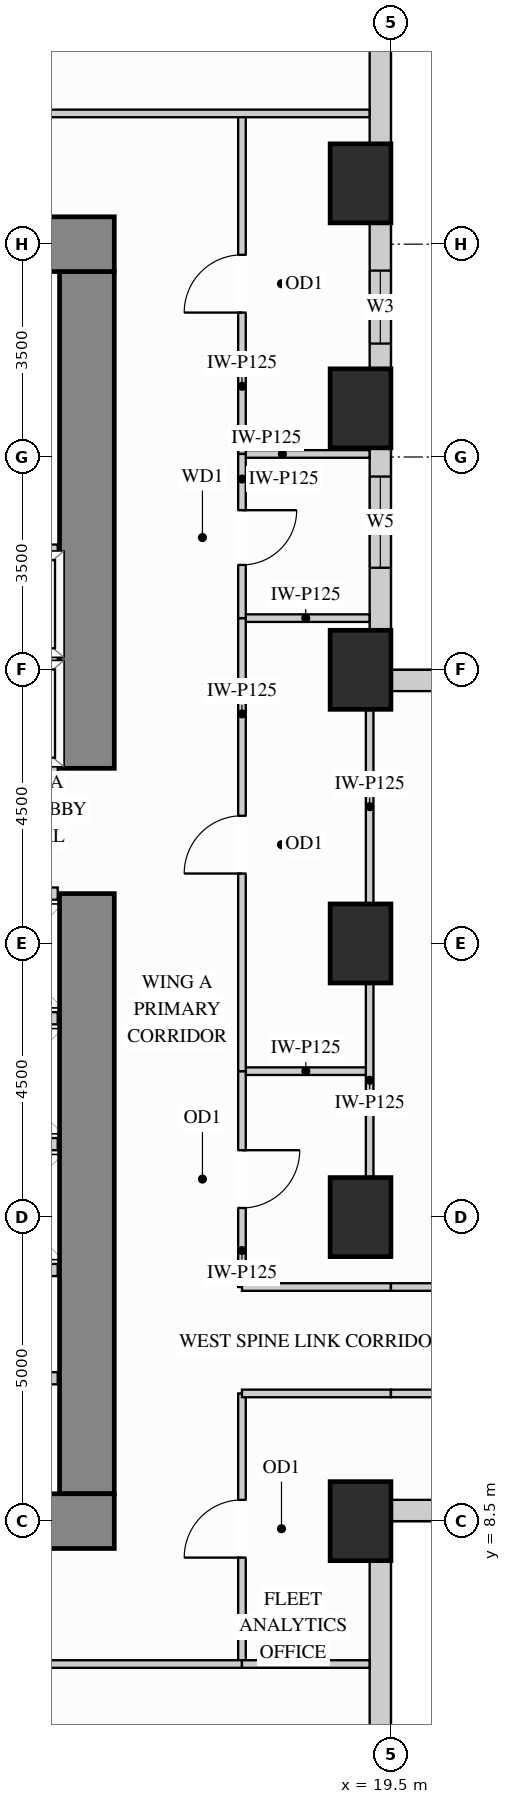
"""IFC4 building model, lengths in metres.
Left out: names, types, materials, properties, quantities, classifications, styles, units other than length and angle.
Written with IfcOpenShell. Run it as: python <this file> out.ifc"""

import sys

from ifc_helpers import new_model, si_unit, direction, frame, frame_2d, origin, origin_2d, place, context, subcontext, project, spatial, rectangle, extrude, source, transform, mapped, element, fill, save


model = new_model("IFC4")
c1 = context("Model", 3, precision=1e-05, world=origin(), true_north=direction((0.0, 1.0)))
c2 = subcontext(c1, "Body", "Model", "MODEL_VIEW")
j1 = project(units=[si_unit("LENGTHUNIT", "METRE"), si_unit("PLANEANGLEUNIT", "RADIAN")], contexts=[c1])
p1 = place(None, origin())
s1 = spatial("IfcSite", under=j1, at=p1, CompositionType="ELEMENT")
p2 = place(p1, origin())
s2 = spatial("IfcBuilding", under=s1, at=p2, CompositionType="ELEMENT")
p3 = place(p2, frame((0.0, 0.0, 62.1)))
s3 = spatial("IfcBuildingStorey", under=s2, at=p3, CompositionType="ELEMENT", Elevation=62.1)
m1 = source(origin(), c2, "Body", "SweptSolid", [
    extrude(rectangle(XDim=1.0, YDim=1.3, at=origin_2d()), origin(), (0.0, 0.0, 1.0), 3.38),
])
for number, where, z_axis, x_axis in (
    (1, (19.0, 13.5, 0.0), (0.0, 0.0, 1.0), (1.0, 0.0, 0.0)),
    (2, (19.0, 18.0, 0.0), (0.0, 0.0, 1.0), (1.0, 0.0, 0.0)),
    (3, (19.0, 22.5, 0.0), (0.0, 0.0, 1.0), (1.0, 0.0, 0.0)),
    (4, (19.0, 26.8, 0.0), (0.0, 0.0, 1.0), (1.0, 0.0, 0.0)),
    (5, (19.0, 30.5, 0.0), (0.0, 0.0, 1.0), (1.0, 0.0, 0.0)),
    (6, (19.0, 8.5, 0.0), (0.0, 0.0, 1.0), (1.0, 0.0, 0.0)),
):
    element("IfcColumn", number, at=place(p3, frame(where, z_axis=z_axis, x_axis=x_axis)), inside=s3, PredefinedType="COLUMN", context=c2, shape_type="MappedRepresentation", body=[
        mapped(m1, transform((0.0, 0.0, 0.0), x_axis=(1.0, 0.0, 0.0), y_axis=(0.0, 1.0, 0.0), z_axis=(0.0, 0.0, 1.0))),
    ])
m2 = source(origin(), c2, "Body", "SweptSolid", [
    extrude(rectangle(XDim=9.87, YDim=0.9, at=frame_2d((4.935, 0.0))), origin(), (0.0, 0.0, 1.0), 3.38),
])
p4 = place(p3, frame((14.5, 8.95, 0.0), z_axis=(0.0, 0.0, 1.0), x_axis=(0.0, 1.0, 0.0)))
e7 = element("IfcWall", 7, at=p4, inside=s3, PredefinedType="SHEAR", context=c2, shape_type="MappedRepresentation", body=[
    mapped(m2, transform((0.0, 0.0, 0.0), x_axis=(1.0, 0.0, 0.0), y_axis=(0.0, 1.0, 0.0), z_axis=(0.0, 0.0, 1.0))),
])
m3 = source(origin(), c2, "Body", "SweptSolid", [
    extrude(rectangle(XDim=8.17, YDim=0.9, at=frame_2d((4.085, 0.0))), origin(), (0.0, 0.0, 1.0), 3.38),
])
p5 = place(p3, frame((14.5, 20.88, 0.0), z_axis=(0.0, 0.0, 1.0), x_axis=(0.0, 1.0, 0.0)))
e8 = element("IfcWall", 8, at=p5, inside=s3, PredefinedType="SHEAR", context=c2, shape_type="MappedRepresentation", body=[
    mapped(m3, transform((0.0, 0.0, 0.0), x_axis=(1.0, 0.0, 0.0), y_axis=(0.0, 1.0, 0.0), z_axis=(0.0, 0.0, 1.0))),
])
m4 = source(origin(), c2, "Body", "SweptSolid", [
    extrude(rectangle(XDim=10.9, YDim=0.9, at=frame_2d((5.45, 0.0))), origin(), (0.0, 0.0, 1.0), 3.38),
])
for number, where, z_axis, x_axis in (
    (9, (4.05, 29.5, 0.0), (0.0, 0.0, 1.0), (1.0, 0.0, 0.0)),
    (10, (4.05, 8.5, 0.0), (0.0, 0.0, 1.0), (1.0, 0.0, 0.0)),
):
    element("IfcWall", number, at=place(p3, frame(where, z_axis=z_axis, x_axis=x_axis)), inside=s3, PredefinedType="SHEAR", context=c2, shape_type="MappedRepresentation", body=[
        mapped(m4, transform((0.0, 0.0, 0.0), x_axis=(1.0, 0.0, 0.0), y_axis=(0.0, 1.0, 0.0), z_axis=(0.0, 0.0, 1.0))),
    ])
m5 = source(origin(), c2, "Body", "SweptSolid", [
    extrude(rectangle(XDim=3.704, YDim=0.35, at=frame_2d((1.852, 0.0))), origin(), (0.0, 0.0, 1.0), 2.51),
])
p6 = place(p3, frame((19.325, 4.148, 0.0), z_axis=(0.0, 0.0, 1.0), x_axis=(0.0, 1.0, 0.0)))
e11 = element("IfcWall", 11, at=p6, inside=s3, PredefinedType="SOLIDWALL", context=c2, shape_type="MappedRepresentation", body=[
    mapped(m5, transform((0.0, 0.0, 0.0), x_axis=(1.0, 0.0, 0.0), y_axis=(0.0, 1.0, 0.0), z_axis=(0.0, 0.0, 1.0))),
])
p7 = place(p3, frame((19.498, 8.675, 0.0), z_axis=(0.0, 0.0, 1.0), x_axis=(1.0, 0.0, 0.0)))
e12 = element("IfcWall", 12, at=p7, inside=s3, PredefinedType="SOLIDWALL", context=c2, shape_type="SweptSolid", body=[
    extrude(rectangle(XDim=3.404, YDim=0.35, at=frame_2d((1.702, 0.0))), origin(), (0.0, 0.0, 1.0), 3.365),
])
p8 = place(p7, frame((0.952, 0.0, 0.78)))
e13 = element("IfcOpeningElement", 13, at=p8, cuts=e12, PredefinedType="OPENING", context=c2, shape_type="SweptSolid", body=[
    extrude(rectangle(XDim=1.5, YDim=2.0, at=frame_2d((0.75, 1.0))), frame((0.0, 0.185, 0.0), z_axis=(0.0, -1.0, 0.0), x_axis=(1.0, 0.0, 0.0)), (0.0, 0.0, 1.0), 0.37),
])
p9 = place(p3, frame((34.352, 22.325, 0.0), z_axis=(0.0, 0.0, 1.0), x_axis=(-1.0, 0.0, 0.0)))
e14 = element("IfcWall", 14, at=p9, inside=s3, PredefinedType="SOLIDWALL", context=c2, shape_type="SweptSolid", body=[
    extrude(rectangle(XDim=14.854, YDim=0.35, at=frame_2d((7.427, 0.0))), origin(), (0.0, 0.0, 1.0), 3.365),
])
p10 = place(p9, frame((4.058, 0.0, 0.78)))
e15 = element("IfcOpeningElement", 15, at=p10, cuts=e14, PredefinedType="OPENING", context=c2, shape_type="SweptSolid", body=[
    extrude(rectangle(XDim=1.5, YDim=2.0, at=frame_2d((0.75, 1.0))), frame((0.0, 0.185, 0.0), z_axis=(0.0, -1.0, 0.0), x_axis=(1.0, 0.0, 0.0)), (0.0, 0.0, 1.0), 0.37),
])
p11 = place(p9, frame((9.296, 0.0, 0.78)))
e16 = element("IfcOpeningElement", 16, at=p11, cuts=e14, PredefinedType="OPENING", context=c2, shape_type="SweptSolid", body=[
    extrude(rectangle(XDim=1.5, YDim=2.0, at=frame_2d((0.75, 1.0))), frame((0.0, 0.185, 0.0), z_axis=(0.0, -1.0, 0.0), x_axis=(1.0, 0.0, 0.0)), (0.0, 0.0, 1.0), 0.37),
])
p12 = place(p3, frame((19.325, 23.148, 0.0), z_axis=(0.0, 0.0, 1.0), x_axis=(0.0, 1.0, 0.0)))
e17 = element("IfcWall", 17, at=p12, inside=s3, PredefinedType="SOLIDWALL", context=c2, shape_type="SweptSolid", body=[
    extrude(rectangle(XDim=3.004, YDim=0.35, at=frame_2d((1.502, 0.0))), origin(), (0.0, 0.0, 1.0), 2.51),
])
p13 = place(p12, frame((1.031, 0.0, 0.78)))
e18 = element("IfcOpeningElement", 18, at=p13, cuts=e17, PredefinedType="OPENING", context=c2, shape_type="SweptSolid", body=[
    extrude(rectangle(XDim=1.5, YDim=1.55, at=frame_2d((0.75, 0.775))), frame((0.0, 0.185, 0.0), z_axis=(0.0, -1.0, 0.0), x_axis=(1.0, 0.0, 0.0)), (0.0, 0.0, 1.0), 0.37),
])
p14 = place(p3, frame((19.325, 27.448, 0.0), z_axis=(0.0, 0.0, 1.0), x_axis=(0.0, 1.0, 0.0)))
e19 = element("IfcWall", 19, at=p14, inside=s3, PredefinedType="SOLIDWALL", context=c2, shape_type="SweptSolid", body=[
    extrude(rectangle(XDim=2.404, YDim=0.35, at=frame_2d((1.202, 0.0))), origin(), (0.0, 0.0, 1.0), 2.51),
])
p15 = place(p14, frame((0.417, 0.0, 0.78)))
e20 = element("IfcOpeningElement", 20, at=p15, cuts=e19, PredefinedType="OPENING", context=c2, shape_type="SweptSolid", body=[
    extrude(rectangle(XDim=1.2, YDim=1.55, at=frame_2d((0.6, 0.775))), frame((0.0, 0.185, 0.0), z_axis=(0.0, -1.0, 0.0), x_axis=(1.0, 0.0, 0.0)), (0.0, 0.0, 1.0), 0.37),
])
m6 = source(origin(), c2, "Body", "SweptSolid", [
    extrude(rectangle(XDim=3.204, YDim=0.35, at=frame_2d((1.602, 0.0))), origin(), (0.0, 0.0, 1.0), 2.51),
])
p16 = place(p3, frame((19.325, 31.148, 0.0), z_axis=(0.0, 0.0, 1.0), x_axis=(0.0, 1.0, 0.0)))
e21 = element("IfcWall", 21, at=p16, inside=s3, PredefinedType="SOLIDWALL", context=c2, shape_type="MappedRepresentation", body=[
    mapped(m6, transform((0.0, 0.0, 0.0), x_axis=(1.0, 0.0, 0.0), y_axis=(0.0, 1.0, 0.0), z_axis=(0.0, 0.0, 1.0))),
])
m7 = source(origin(), c2, "Body", "SweptSolid", [
    extrude(rectangle(XDim=2.1, YDim=0.125, at=frame_2d((1.05, 0.0))), origin(), (0.0, 0.0, 1.0), 3.365),
])
p17 = place(p3, frame((17.05, 15.9, 0.0), z_axis=(0.0, 0.0, 1.0), x_axis=(1.0, 0.0, 0.0)))
e22 = element("IfcWall", 22, at=p17, inside=s3, PredefinedType="PARTITIONING", context=c2, shape_type="MappedRepresentation", body=[
    mapped(m7, transform((0.0, 0.0, 0.0), x_axis=(1.0, 0.0, 0.0), y_axis=(0.0, 1.0, 0.0), z_axis=(0.0, 0.0, 1.0))),
])
m8 = source(origin(), c2, "Body", "SweptSolid", [
    extrude(rectangle(XDim=2.098, YDim=0.125, at=frame_2d((1.049, 0.0))), origin(), (0.0, 0.0, 1.0), 3.365),
])
for number, where, z_axis, x_axis in (
    (23, (17.05, 23.35, 0.0), (0.0, 0.0, 1.0), (1.0, 0.0, 0.0)),
    (24, (17.05, 26.05, 0.0), (0.0, 0.0, 1.0), (1.0, 0.0, 0.0)),
):
    element("IfcWall", number, at=place(p3, frame(where, z_axis=z_axis, x_axis=x_axis)), inside=s3, PredefinedType="PARTITIONING", context=c2, shape_type="MappedRepresentation", body=[
        mapped(m8, transform((0.0, 0.0, 0.0), x_axis=(1.0, 0.0, 0.0), y_axis=(0.0, 1.0, 0.0), z_axis=(0.0, 0.0, 1.0))),
    ])
m9 = source(origin(), c2, "Body", "SweptSolid", [
    extrude(rectangle(XDim=3.18, YDim=0.125, at=frame_2d((1.59, 0.0))), origin(), (0.0, 0.0, 1.0), 2.67),
])
for number, where, z_axis, x_axis in (
    (25, (19.15, 14.16, 0.0), (0.0, 0.0, 1.0), (0.0, 1.0, 0.0)),
    (26, (19.15, 18.66, 0.0), (0.0, 0.0, 1.0), (0.0, 1.0, 0.0)),
):
    element("IfcWall", number, at=place(p3, frame(where, z_axis=z_axis, x_axis=x_axis)), inside=s3, PredefinedType="PARTITIONING", context=c2, shape_type="MappedRepresentation", body=[
        mapped(m9, transform((0.0, 0.0, 0.0), x_axis=(1.0, 0.0, 0.0), y_axis=(0.0, 1.0, 0.0), z_axis=(0.0, 0.0, 1.0))),
    ])
p18 = place(p3, frame((17.05, 12.35, 0.0), z_axis=(0.0, 0.0, 1.0), x_axis=(0.0, 1.0, 0.0)))
e27 = element("IfcWall", 27, at=p18, inside=s3, PredefinedType="PARTITIONING", context=c2, shape_type="SweptSolid", body=[
    extrude(rectangle(XDim=3.55, YDim=0.125, at=frame_2d((1.775, 0.0))), origin(), (0.0, 0.0, 1.0), 3.365),
])
p19 = place(p18, frame((1.3, 0.0, 0.0)))
e28 = element("IfcOpeningElement", 28, at=p19, cuts=e27, PredefinedType="OPENING", context=c2, shape_type="SweptSolid", body=[
    extrude(rectangle(XDim=0.95, YDim=2.15, at=frame_2d((0.475, 1.075))), frame((0.0, 0.073, 0.0), z_axis=(0.0, -1.0, 0.0), x_axis=(1.0, 0.0, 0.0)), (0.0, 0.0, 1.0), 0.145),
])
p20 = place(p3, frame((17.05, 15.9, 0.0), z_axis=(0.0, 0.0, 1.0), x_axis=(0.0, 1.0, 0.0)))
e29 = element("IfcWall", 29, at=p20, inside=s3, PredefinedType="PARTITIONING", context=c2, shape_type="SweptSolid", body=[
    extrude(rectangle(XDim=7.45, YDim=0.125, at=frame_2d((3.725, 0.0))), origin(), (0.0, 0.0, 1.0), 3.365),
])
p21 = place(p20, frame((3.25, 0.0, 0.0)))
e30 = element("IfcOpeningElement", 30, at=p21, cuts=e29, PredefinedType="OPENING", context=c2, shape_type="SweptSolid", body=[
    extrude(rectangle(XDim=0.95, YDim=2.15, at=frame_2d((0.475, 1.075))), frame((0.0, 0.073, 0.0), z_axis=(0.0, -1.0, 0.0), x_axis=(1.0, 0.0, 0.0)), (0.0, 0.0, 1.0), 0.145),
])
p22 = place(p3, frame((17.05, 26.05, 0.0), z_axis=(0.0, 0.0, 1.0), x_axis=(0.0, 1.0, 0.0)))
e31 = element("IfcWall", 31, at=p22, inside=s3, PredefinedType="PARTITIONING", context=c2, shape_type="SweptSolid", body=[
    extrude(rectangle(XDim=5.6, YDim=0.125, at=frame_2d((2.8, 0.0))), origin(), (0.0, 0.0, 1.0), 3.365),
])
p23 = place(p22, frame((2.325, 0.0, 0.0)))
e32 = element("IfcOpeningElement", 32, at=p23, cuts=e31, PredefinedType="OPENING", context=c2, shape_type="SweptSolid", body=[
    extrude(rectangle(XDim=0.95, YDim=2.15, at=frame_2d((0.475, 1.075))), frame((0.0, 0.073, 0.0), z_axis=(0.0, -1.0, 0.0), x_axis=(1.0, 0.0, 0.0)), (0.0, 0.0, 1.0), 0.145),
])
p24 = place(p3, frame((17.05, 6.15, 0.0), z_axis=(0.0, 0.0, 1.0), x_axis=(0.0, 1.0, 0.0)))
e33 = element("IfcWall", 33, at=p24, inside=s3, PredefinedType="PARTITIONING", context=c2, shape_type="SweptSolid", body=[
    extrude(rectangle(XDim=4.45, YDim=0.125, at=frame_2d((2.225, 0.0))), origin(), (0.0, 0.0, 1.0), 3.365),
])
p25 = place(p24, frame((1.75, 0.0, 0.0)))
e34 = element("IfcOpeningElement", 34, at=p25, cuts=e33, PredefinedType="OPENING", context=c2, shape_type="SweptSolid", body=[
    extrude(rectangle(XDim=0.95, YDim=2.15, at=frame_2d((0.475, 1.075))), frame((0.0, 0.073, 0.0), z_axis=(0.0, -1.0, 0.0), x_axis=(1.0, 0.0, 0.0)), (0.0, 0.0, 1.0), 0.145),
])
p26 = place(p3, frame((17.05, 23.35, 0.0), z_axis=(0.0, 0.0, 1.0), x_axis=(0.0, 1.0, 0.0)))
e35 = element("IfcWall", 35, at=p26, inside=s3, PredefinedType="PARTITIONING", context=c2, shape_type="SweptSolid", body=[
    extrude(rectangle(XDim=2.7, YDim=0.125, at=frame_2d((1.35, 0.0))), origin(), (0.0, 0.0, 1.0), 3.365),
])
p27 = place(p26, frame((0.875, 0.0, 0.0)))
e36 = element("IfcOpeningElement", 36, at=p27, cuts=e35, PredefinedType="OPENING", context=c2, shape_type="SweptSolid", body=[
    extrude(rectangle(XDim=0.9, YDim=2.15, at=frame_2d((0.45, 1.075))), frame((0.0, 0.073, 0.0), z_axis=(0.0, -1.0, 0.0), x_axis=(1.0, 0.0, 0.0)), (0.0, 0.0, 1.0), 0.145),
])
m10 = source(origin(), c2, "Body", "SweptSolid", [
    extrude(rectangle(XDim=5.798, YDim=0.125, at=frame_2d((2.899, 0.0))), origin(), (0.0, 0.0, 1.0), 2.828),
])
p28 = place(p3, frame((13.35, 31.65, 0.0), z_axis=(0.0, 0.0, 1.0), x_axis=(1.0, 0.0, 0.0)))
e37 = element("IfcWall", 37, at=p28, inside=s3, PredefinedType="PARTITIONING", context=c2, shape_type="MappedRepresentation", body=[
    mapped(m10, transform((0.0, 0.0, 0.0), x_axis=(1.0, 0.0, 0.0), y_axis=(0.0, 1.0, 0.0), z_axis=(0.0, 0.0, 1.0))),
])
m11 = source(origin(), c2, "Body", "SweptSolid", [
    extrude(rectangle(XDim=2.45, YDim=0.125, at=frame_2d((1.225, 0.0))), origin(), (0.0, 0.0, 1.0), 3.365),
])
p29 = place(p3, frame((17.05, 12.35, 0.0), z_axis=(0.0, 0.0, 1.0), x_axis=(1.0, 0.0, 0.0)))
e38 = element("IfcWall", 38, at=p29, inside=s3, PredefinedType="PARTITIONING", context=c2, shape_type="MappedRepresentation", body=[
    mapped(m11, transform((0.0, 0.0, 0.0), x_axis=(1.0, 0.0, 0.0), y_axis=(0.0, 1.0, 0.0), z_axis=(0.0, 0.0, 1.0))),
])
p30 = place(p3, frame((19.5, 12.35, 0.0), z_axis=(0.0, 0.0, 1.0), x_axis=(1.0, 0.0, 0.0)))
e39 = element("IfcWall", 39, at=p30, inside=s3, PredefinedType="PARTITIONING", context=c2, shape_type="SweptSolid", body=[
    extrude(rectangle(XDim=4.55, YDim=0.125, at=frame_2d((2.275, 0.0))), origin(), (0.0, 0.0, 1.0), 3.365),
])
p31 = place(p30, frame((1.8, 0.0, 0.0)))
e40 = element("IfcOpeningElement", 40, at=p31, cuts=e39, PredefinedType="OPENING", context=c2, shape_type="SweptSolid", body=[
    extrude(rectangle(XDim=0.95, YDim=2.15, at=frame_2d((0.475, 1.075))), frame((0.0, 0.073, 0.0), z_axis=(0.0, -1.0, 0.0), x_axis=(1.0, 0.0, 0.0)), (0.0, 0.0, 1.0), 0.145),
])
p32 = place(p3, frame((17.05, 10.6, 0.0), z_axis=(0.0, 0.0, 1.0), x_axis=(1.0, 0.0, 0.0)))
e41 = element("IfcWall", 41, at=p32, inside=s3, PredefinedType="PARTITIONING", context=c2, shape_type="MappedRepresentation", body=[
    mapped(m11, transform((0.0, 0.0, 0.0), x_axis=(1.0, 0.0, 0.0), y_axis=(0.0, 1.0, 0.0), z_axis=(0.0, 0.0, 1.0))),
])
p33 = place(p3, frame((19.5, 10.6, 0.0), z_axis=(0.0, 0.0, 1.0), x_axis=(1.0, 0.0, 0.0)))
e42 = element("IfcWall", 42, at=p33, inside=s3, PredefinedType="PARTITIONING", context=c2, shape_type="SweptSolid", body=[
    extrude(rectangle(XDim=7.45, YDim=0.125, at=frame_2d((3.725, 0.0))), origin(), (0.0, 0.0, 1.0), 3.365),
])
p34 = place(p33, frame((1.817, 0.0, 0.0)))
e43 = element("IfcOpeningElement", 43, at=p34, cuts=e42, PredefinedType="OPENING", context=c2, shape_type="SweptSolid", body=[
    extrude(rectangle(XDim=0.95, YDim=2.15, at=frame_2d((0.475, 1.075))), frame((0.0, 0.073, 0.0), z_axis=(0.0, -1.0, 0.0), x_axis=(1.0, 0.0, 0.0)), (0.0, 0.0, 1.0), 0.145),
])
p35 = place(p3, frame((9.385, 6.15, 0.0), z_axis=(0.0, 0.0, 1.0), x_axis=(1.0, 0.0, 0.0)))
e44 = element("IfcWall", 44, at=p35, inside=s3, PredefinedType="PARTITIONING", context=c2, shape_type="SweptSolid", body=[
    extrude(rectangle(XDim=7.665, YDim=0.125, at=frame_2d((3.833, 0.0))), origin(), (0.0, 0.0, 1.0), 3.365),
])
p36 = place(p35, frame((3.357, 0.0, 0.0)))
e45 = element("IfcOpeningElement", 45, at=p36, cuts=e44, PredefinedType="OPENING", context=c2, shape_type="SweptSolid", body=[
    extrude(rectangle(XDim=0.95, YDim=2.15, at=frame_2d((0.475, 1.075))), frame((0.0, 0.073, 0.0), z_axis=(0.0, -1.0, 0.0), x_axis=(1.0, 0.0, 0.0)), (0.0, 0.0, 1.0), 0.145),
])
p37 = place(p3, frame((17.05, 6.15, 0.0), z_axis=(0.0, 0.0, 1.0), x_axis=(1.0, 0.0, 0.0)))
e46 = element("IfcWall", 46, at=p37, inside=s3, PredefinedType="PARTITIONING", context=c2, shape_type="MappedRepresentation", body=[
    mapped(m8, transform((0.0, 0.0, 0.0), x_axis=(1.0, 0.0, 0.0), y_axis=(0.0, 1.0, 0.0), z_axis=(0.0, 0.0, 1.0))),
])
m12 = source(origin(), c2, "Body", "SweptSolid", [
    extrude(rectangle(XDim=1.6, YDim=0.2, at=frame_2d((0.8, 0.0))), origin(), (0.0, 0.0, 1.0), 3.365),
])
p38 = place(p3, frame((12.42, 10.85, 0.0), z_axis=(0.0, 0.0, 1.0), x_axis=(1.0, 0.0, 0.0)))
e47 = element("IfcWall", 47, at=p38, inside=s3, PredefinedType="PARTITIONING", context=c2, shape_type="MappedRepresentation", body=[
    mapped(m12, transform((0.0, 0.0, 0.0), x_axis=(1.0, 0.0, 0.0), y_axis=(0.0, 1.0, 0.0), z_axis=(0.0, 0.0, 1.0))),
])
m13 = source(origin(), c2, "Body", "SweptSolid", [
    extrude(rectangle(XDim=2.19, YDim=0.2, at=frame_2d((1.095, 0.0))), origin(), (0.0, 0.0, 1.0), 3.365),
])
for number, where, z_axis, x_axis in (
    (48, (11.83, 22.66, 0.0), (0.0, 0.0, 1.0), (1.0, 0.0, 0.0)),
    (49, (11.83, 20.9, 0.0), (0.0, 0.0, 1.0), (1.0, 0.0, 0.0)),
    (50, (11.83, 24.46, 0.0), (0.0, 0.0, 1.0), (1.0, 0.0, 0.0)),
):
    element("IfcWall", number, at=place(p3, frame(where, z_axis=z_axis, x_axis=x_axis)), inside=s3, PredefinedType="PARTITIONING", context=c2, shape_type="MappedRepresentation", body=[
        mapped(m13, transform((0.0, 0.0, 0.0), x_axis=(1.0, 0.0, 0.0), y_axis=(0.0, 1.0, 0.0), z_axis=(0.0, 0.0, 1.0))),
    ])
m14 = source(origin(), c2, "Body", "SweptSolid", [
    extrude(rectangle(XDim=1.79, YDim=0.2, at=frame_2d((0.895, 0.0))), origin(), (0.0, 0.0, 1.0), 3.365),
])
for number, where, z_axis, x_axis in (
    (51, (12.23, 14.7, 0.0), (0.0, 0.0, 1.0), (1.0, 0.0, 0.0)),
    (52, (12.23, 12.63, 0.0), (0.0, 0.0, 1.0), (1.0, 0.0, 0.0)),
    (53, (12.23, 16.77, 0.0), (0.0, 0.0, 1.0), (1.0, 0.0, 0.0)),
    (54, (12.23, 18.82, 0.0), (0.0, 0.0, 1.0), (1.0, 0.0, 0.0)),
):
    element("IfcWall", number, at=place(p3, frame(where, z_axis=z_axis, x_axis=x_axis)), inside=s3, PredefinedType="PARTITIONING", context=c2, shape_type="MappedRepresentation", body=[
        mapped(m14, transform((0.0, 0.0, 0.0), x_axis=(1.0, 0.0, 0.0), y_axis=(0.0, 1.0, 0.0), z_axis=(0.0, 0.0, 1.0))),
    ])
m15 = source(origin(), c2, "Body", "SweptSolid", [
    extrude(rectangle(XDim=0.95, YDim=2.15, at=frame_2d((0.475, 1.075))), frame((0.0, 0.025, 0.0), z_axis=(0.0, -1.0, 0.0), x_axis=(1.0, 0.0, 0.0)), (0.0, 0.0, 1.0), 0.05),
])
p39 = place(p25, origin())
e55 = element("IfcDoor", 55, at=p39, inside=s3, OperationType="SINGLE_SWING_LEFT", PredefinedType="DOOR", context=c2, shape_type="MappedRepresentation", body=[
    mapped(m15, transform((0.0, 0.0, 0.0), x_axis=(1.0, 0.0, 0.0), y_axis=(0.0, 1.0, 0.0), z_axis=(0.0, 0.0, 1.0))),
])
fill(e34, e55)
p40 = place(p19, origin())
e56 = element("IfcDoor", 56, at=p40, inside=s3, OperationType="SINGLE_SWING_RIGHT", PredefinedType="DOOR", context=c2, shape_type="MappedRepresentation", body=[
    mapped(m15, transform((0.0, 0.0, 0.0), x_axis=(1.0, 0.0, 0.0), y_axis=(0.0, 1.0, 0.0), z_axis=(0.0, 0.0, 1.0))),
])
fill(e28, e56)
p41 = place(p21, origin())
e57 = element("IfcDoor", 57, at=p41, inside=s3, OperationType="SINGLE_SWING_LEFT", PredefinedType="DOOR", context=c2, shape_type="MappedRepresentation", body=[
    mapped(m15, transform((0.0, 0.0, 0.0), x_axis=(1.0, 0.0, 0.0), y_axis=(0.0, 1.0, 0.0), z_axis=(0.0, 0.0, 1.0))),
])
fill(e30, e57)
p42 = place(p23, origin())
e58 = element("IfcDoor", 58, at=p42, inside=s3, OperationType="SINGLE_SWING_LEFT", PredefinedType="DOOR", context=c2, shape_type="MappedRepresentation", body=[
    mapped(m15, transform((0.0, 0.0, 0.0), x_axis=(1.0, 0.0, 0.0), y_axis=(0.0, 1.0, 0.0), z_axis=(0.0, 0.0, 1.0))),
])
fill(e32, e58)
m16 = source(origin(), c2, "Body", "SweptSolid", [
    extrude(rectangle(XDim=0.9, YDim=2.15, at=frame_2d((0.45, 1.075))), frame((0.0, 0.025, 0.0), z_axis=(0.0, -1.0, 0.0), x_axis=(1.0, 0.0, 0.0)), (0.0, 0.0, 1.0), 0.05),
])
p43 = place(p27, origin())
e59 = element("IfcDoor", 59, at=p43, inside=s3, OperationType="SINGLE_SWING_RIGHT", PredefinedType="DOOR", context=c2, shape_type="MappedRepresentation", body=[
    mapped(m16, transform((0.0, 0.0, 0.0), x_axis=(1.0, 0.0, 0.0), y_axis=(0.0, 1.0, 0.0), z_axis=(0.0, 0.0, 1.0))),
])
fill(e36, e59)
m17 = source(origin(), c2, "Body", "SweptSolid", [
    extrude(rectangle(XDim=1.2, YDim=1.55, at=frame_2d((0.6, 0.775))), frame((0.0, 0.03, 0.0), z_axis=(0.0, -1.0, 0.0), x_axis=(1.0, 0.0, 0.0)), (0.0, 0.0, 1.0), 0.06),
])
p44 = place(p15, origin())
e60 = element("IfcWindow", 60, at=p44, inside=s3, PartitioningType="SINGLE_PANEL", PredefinedType="WINDOW", context=c2, shape_type="MappedRepresentation", body=[
    mapped(m17, transform((0.0, 0.0, 0.0), x_axis=(1.0, 0.0, 0.0), y_axis=(0.0, 1.0, 0.0), z_axis=(0.0, 0.0, 1.0))),
])
fill(e20, e60)
m18 = source(origin(), c2, "Body", "SweptSolid", [
    extrude(rectangle(XDim=1.5, YDim=1.55, at=frame_2d((0.75, 0.775))), frame((0.0, 0.03, 0.0), z_axis=(0.0, -1.0, 0.0), x_axis=(1.0, 0.0, 0.0)), (0.0, 0.0, 1.0), 0.06),
])
p45 = place(p13, origin())
e61 = element("IfcWindow", 61, at=p45, inside=s3, PartitioningType="SINGLE_PANEL", PredefinedType="WINDOW", context=c2, shape_type="MappedRepresentation", body=[
    mapped(m18, transform((0.0, 0.0, 0.0), x_axis=(1.0, 0.0, 0.0), y_axis=(0.0, 1.0, 0.0), z_axis=(0.0, 0.0, 1.0))),
])
fill(e18, e61)
save(model, sys.argv[1])
